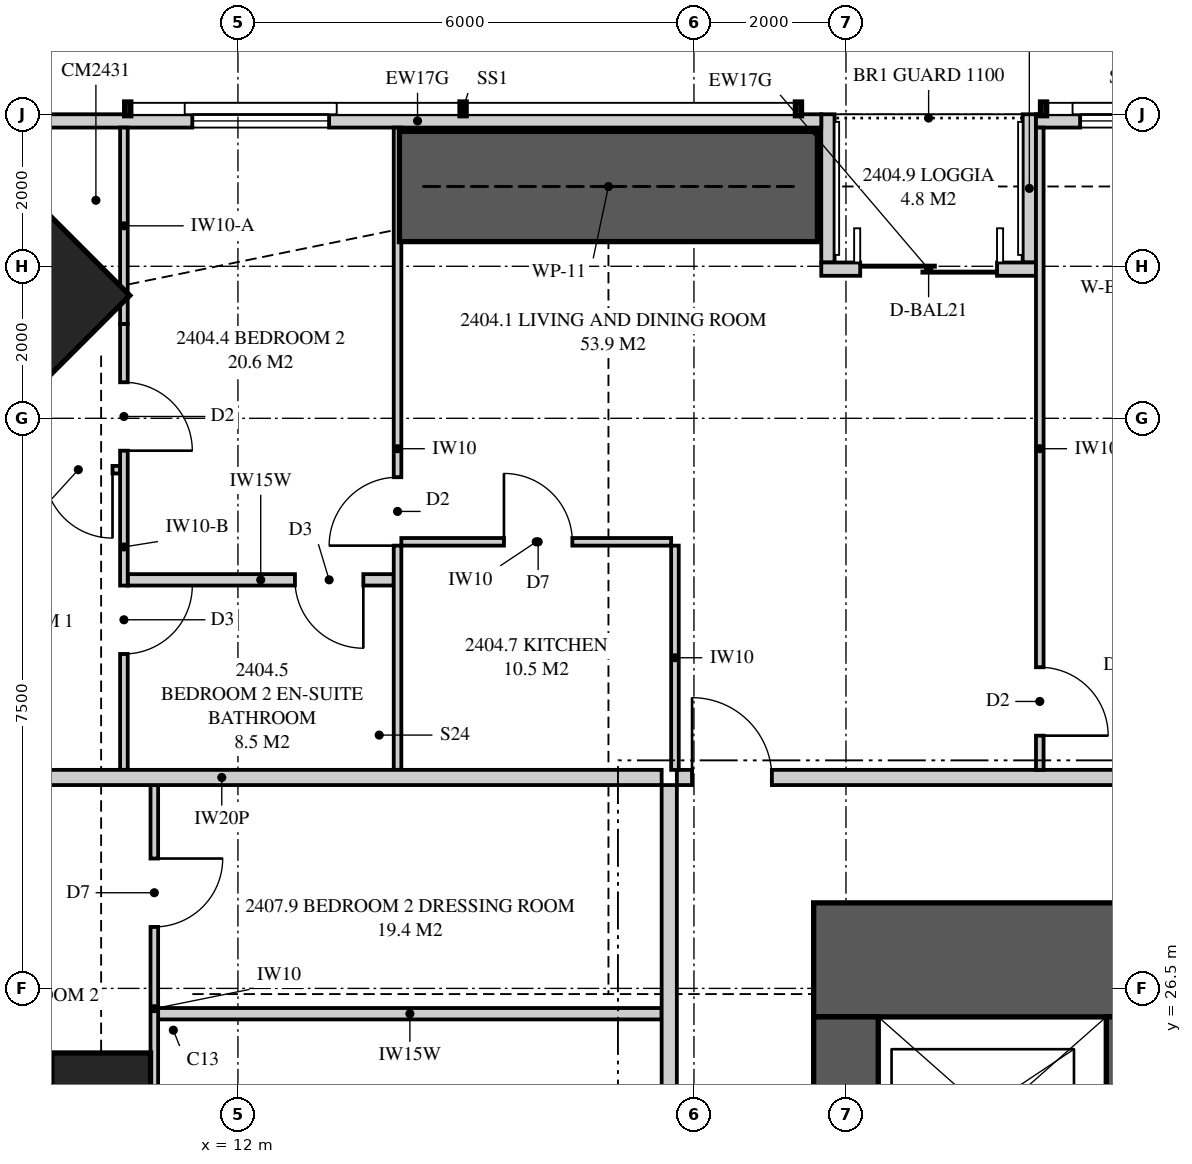
"""IFC4 building model, lengths in metres.
Left out: names, types, materials, properties, quantities, classifications, styles, units other than length and angle.
Written with IfcOpenShell. Run it as: python <this file> out.ifc"""

import sys

from ifc_helpers import new_model, si_unit, direction, frame, frame_2d, origin, origin_2d, place, context, subcontext, project, spatial, polyline, rectangle, outline, extrude, element, fill, save


model = new_model("IFC4")
c1 = context("Model", 3, precision=1e-05, world=origin(), true_north=direction((0.0, 1.0)))
c2 = subcontext(c1, "Body", "Model", "MODEL_VIEW")
j1 = project(units=[si_unit("LENGTHUNIT", "METRE"), si_unit("PLANEANGLEUNIT", "RADIAN")], contexts=[c1])
p1 = place(None, origin())
s1 = spatial("IfcSite", under=j1, at=p1, CompositionType="ELEMENT")
p2 = place(p1, origin())
s2 = spatial("IfcBuilding", under=s1, at=p2, CompositionType="ELEMENT")
p3 = place(p2, frame((0.0, 0.0, 91.45)))
s3 = spatial("IfcBuildingStorey", under=s2, at=p3, CompositionType="ELEMENT", Elevation=91.45)
p4 = place(p3, frame((8.631, 35.369, 0.0), z_axis=(0.0, 0.0, 1.0), x_axis=(0.707106781187, -0.707106781187, 0.0)))
e1 = element("IfcColumn", 1, at=p4, inside=s3, PredefinedType="COLUMN", context=c2, shape_type="SweptSolid", body=[
    extrude(rectangle(XDim=2.4, YDim=3.1, at=origin_2d()), origin(), (0.0, 0.0, 1.0), 3.35),
])
p5 = place(p3, frame((10.2, 25.0, 0.0), z_axis=(0.0, 0.0, 1.0), x_axis=(1.0, 0.0, 0.0)))
e2 = element("IfcColumn", 2, at=p5, inside=s3, PredefinedType="COLUMN", context=c2, shape_type="SweptSolid", body=[
    extrude(rectangle(XDim=1.3, YDim=1.3, at=origin_2d()), origin(), (0.0, 0.0, 1.0), 3.35),
])
p6 = place(p3, frame((26.0, 26.875, 0.0), z_axis=(0.0, 0.0, 1.0), x_axis=(-1.0, 0.0, 0.0)))
e3 = element("IfcWall", 3, at=p6, inside=s3, PredefinedType="SHEAR", context=c2, shape_type="SweptSolid", body=[
    extrude(rectangle(XDim=6.425, YDim=1.5, at=frame_2d((3.212, 0.0))), origin(), (0.0, 0.0, 1.0), 3.35),
])
p7 = place(p6, frame((0.825, 0.0, 0.0)))
e4 = element("IfcOpeningElement", 4, at=p7, cuts=e3, PredefinedType="OPENING", context=c2, shape_type="SweptSolid", body=[
    extrude(rectangle(XDim=0.75, YDim=2.1, at=frame_2d((0.375, 1.05))), frame((0.0, 0.76, 0.0), z_axis=(0.0, -1.0, 0.0), x_axis=(1.0, 0.0, 0.0)), (0.0, 0.0, 1.0), 1.52),
])
p8 = place(p3, frame((20.0, 26.125, 0.0), z_axis=(0.0, 0.0, 1.0), x_axis=(0.0, -1.0, 0.0)))
e5 = element("IfcWall", 5, at=p8, inside=s3, PredefinedType="SHEAR", context=c2, shape_type="SweptSolid", body=[
    extrude(rectangle(XDim=2.825, YDim=0.85, at=frame_2d((1.413, 0.0))), origin(), (0.0, 0.0, 1.0), 3.35),
])
p9 = place(p3, frame((23.6, 23.3, 0.0), z_axis=(0.0, 0.0, 1.0), x_axis=(0.0, 1.0, 0.0)))
e6 = element("IfcWall", 6, at=p9, inside=s3, PredefinedType="SHEAR", context=c2, shape_type="SweptSolid", body=[
    extrude(rectangle(XDim=2.825, YDim=0.35, at=frame_2d((1.413, 0.0))), origin(), (0.0, 0.0, 1.0), 3.35),
])
p10 = place(p3, frame((30.675, 37.913, 0.0), z_axis=(0.0, 0.0, 1.0), x_axis=(-1.0, 0.0, 0.0)))
e7 = element("IfcWall", 7, at=p10, inside=s3, PredefinedType="SOLIDWALL", context=c2, shape_type="SweptSolid", body=[
    extrude(rectangle(XDim=8.175, YDim=0.175, at=frame_2d((4.087, 0.0))), origin(), (0.0, 0.0, 1.0), 2.15),
])
p11 = place(p10, frame((5.794, 0.0, 0.4)))
e8 = element("IfcOpeningElement", 8, at=p11, cuts=e7, PredefinedType="OPENING", context=c2, shape_type="SweptSolid", body=[
    extrude(rectangle(XDim=1.8, YDim=1.7, at=frame_2d((0.9, 0.85))), frame((0.0, 0.097, 0.0), z_axis=(0.0, -1.0, 0.0), x_axis=(1.0, 0.0, 0.0)), (0.0, 0.0, 1.0), 0.195),
])
p12 = place(p3, frame((19.675, 37.913, 0.0), z_axis=(0.0, 0.0, 1.0), x_axis=(-1.0, 0.0, 0.0)))
e9 = element("IfcWall", 9, at=p12, inside=s3, PredefinedType="SOLIDWALL", context=c2, shape_type="SweptSolid", body=[
    extrude(outline(polyline([(0.0, 0.0), (10.624, 0.0), (10.624, 3.11), (3.003, 3.11), (3.003, 2.15), (2.958, 2.15), (2.958, 3.11), (2.8, 3.11), (2.8, 2.15), (0.0, 2.15), (0.0, 0.0)])), frame((0.0, 0.087, 0.0), z_axis=(0.0, -1.0, 0.0), x_axis=(1.0, 0.0, 0.0)), (0.0, 0.0, 1.0), 0.175),
])
p13 = place(p12, frame((6.475, 0.0, 0.4)))
e10 = element("IfcOpeningElement", 10, at=p13, cuts=e9, PredefinedType="OPENING", context=c2, shape_type="SweptSolid", body=[
    extrude(rectangle(XDim=1.8, YDim=1.7, at=frame_2d((0.9, 0.85))), frame((0.0, 0.097, 0.0), z_axis=(0.0, -1.0, 0.0), x_axis=(1.0, 0.0, 0.0)), (0.0, 0.0, 1.0), 0.195),
])
p14 = place(p3, frame((22.5, 35.962, 0.0), z_axis=(0.0, 0.0, 1.0), x_axis=(-1.0, 0.0, 0.0)))
e11 = element("IfcWall", 11, at=p14, inside=s3, PredefinedType="SOLIDWALL", context=c2, shape_type="SweptSolid", body=[
    extrude(rectangle(XDim=2.825, YDim=0.175, at=frame_2d((1.413, 0.0))), origin(), (0.0, 0.0, 1.0), 3.11),
])
p15 = place(p14, frame((0.512, 0.0, 0.0)))
e12 = element("IfcOpeningElement", 12, at=p15, cuts=e11, PredefinedType="OPENING", context=c2, shape_type="SweptSolid", body=[
    extrude(rectangle(XDim=1.8, YDim=2.1, at=frame_2d((0.9, 1.05))), frame((0.0, 0.097, 0.0), z_axis=(0.0, -1.0, 0.0), x_axis=(1.0, 0.0, 0.0)), (0.0, 0.0, 1.0), 0.195),
])
for number, where, z_axis, x_axis in (
    (13, (22.413, 38.0, 0.0), (0.0, 0.0, 1.0), (0.0, -1.0, 0.0)),
    (14, (19.762, 38.0, 0.0), (0.0, 0.0, 1.0), (0.0, -1.0, 0.0)),
):
    element("IfcWall", number, at=place(p3, frame(where, z_axis=z_axis, x_axis=x_axis)), inside=s3, PredefinedType="SOLIDWALL", context=c2, shape_type="SweptSolid", body=[
        extrude(outline(polyline([(0.0, 0.0), (1.95, 0.0), (1.95, 3.11), (1.75, 3.11), (1.75, 2.15), (0.15, 2.15), (0.15, 3.11), (0.0, 3.11), (0.0, 0.0)])), frame((0.0, 0.087, 0.0), z_axis=(0.0, -1.0, 0.0), x_axis=(1.0, 0.0, 0.0)), (0.0, 0.0, 1.0), 0.175),
    ])
p16 = place(p3, frame((17.775, 29.275, 0.0), z_axis=(0.0, 0.0, 1.0), x_axis=(1.0, 0.0, 0.0)))
e15 = element("IfcWall", 15, at=p16, inside=s3, PredefinedType="PARTITIONING", context=c2, shape_type="SweptSolid", body=[
    extrude(rectangle(XDim=8.375, YDim=0.2, at=frame_2d((4.188, 0.0))), origin(), (0.0, 0.0, 1.0), 3.11),
])
p17 = place(p16, frame((0.2, 0.0, 0.0)))
e16 = element("IfcOpeningElement", 16, at=p17, cuts=e15, PredefinedType="OPENING", context=c2, shape_type="SweptSolid", body=[
    extrude(rectangle(XDim=1.05, YDim=2.2, at=frame_2d((0.525, 1.1))), frame((0.0, 0.11, 0.0), z_axis=(0.0, -1.0, 0.0), x_axis=(1.0, 0.0, 0.0)), (0.0, 0.0, 1.0), 0.22),
])
p18 = place(p3, frame((10.5, 37.825, 0.0), z_axis=(0.0, 0.0, 1.0), x_axis=(0.0, -1.0, 0.0)))
e17 = element("IfcWall", 17, at=p18, inside=s3, PredefinedType="PARTITIONING", context=c2, shape_type="SweptSolid", body=[
    extrude(outline(polyline([(0.0, 0.0), (2.585, 0.0), (2.585, 2.15), (1.198, 2.15), (1.198, 3.11), (0.0, 3.11), (0.0, 0.0)])), frame((0.0, 0.05, 0.0), z_axis=(0.0, -1.0, 0.0), x_axis=(1.0, 0.0, 0.0)), (0.0, 0.0, 1.0), 0.1),
])
p19 = place(p3, frame((10.5, 35.24, 0.0), z_axis=(0.0, 0.0, 1.0), x_axis=(0.0, -1.0, 0.0)))
e18 = element("IfcWall", 18, at=p19, inside=s3, PredefinedType="PARTITIONING", context=c2, shape_type="SweptSolid", body=[
    extrude(outline(polyline([(0.0, 0.0), (5.865, 0.0), (5.865, 2.51), (0.368, 2.51), (0.368, 2.15), (0.0, 2.15), (0.0, 0.0)])), frame((0.0, 0.05, 0.0), z_axis=(0.0, -1.0, 0.0), x_axis=(1.0, 0.0, 0.0)), (0.0, 0.0, 1.0), 0.1),
])
p20 = place(p19, frame((0.766, 0.0, 0.0)))
e19 = element("IfcOpeningElement", 19, at=p20, cuts=e18, PredefinedType="OPENING", context=c2, shape_type="SweptSolid", body=[
    extrude(rectangle(XDim=0.9, YDim=2.1, at=frame_2d((0.45, 1.05))), frame((0.0, 0.06, 0.0), z_axis=(0.0, -1.0, 0.0), x_axis=(1.0, 0.0, 0.0)), (0.0, 0.0, 1.0), 0.12),
])
p21 = place(p19, frame((3.441, 0.0, 0.0)))
e20 = element("IfcOpeningElement", 20, at=p21, cuts=e18, PredefinedType="OPENING", context=c2, shape_type="SweptSolid", body=[
    extrude(rectangle(XDim=0.9, YDim=2.1, at=frame_2d((0.45, 1.05))), frame((0.0, 0.06, 0.0), z_axis=(0.0, -1.0, 0.0), x_axis=(1.0, 0.0, 0.0)), (0.0, 0.0, 1.0), 0.12),
])
p22 = place(p3, frame((14.1, 37.825, 0.0), z_axis=(0.0, 0.0, 1.0), x_axis=(0.0, -1.0, 0.0)))
e21 = element("IfcWall", 21, at=p22, inside=s3, PredefinedType="PARTITIONING", context=c2, shape_type="SweptSolid", body=[
    extrude(outline(polyline([(0.0, 0.0), (8.45, 0.0), (8.45, 3.11), (2.219, 3.11), (2.219, 2.15), (0.463, 2.15), (0.463, 3.11), (0.0, 3.11), (0.0, 0.0)])), frame((0.0, 0.05, 0.0), z_axis=(0.0, -1.0, 0.0), x_axis=(1.0, 0.0, 0.0)), (0.0, 0.0, 1.0), 0.1),
])
p23 = place(p22, frame((4.6, 0.0, 0.0)))
e22 = element("IfcOpeningElement", 22, at=p23, cuts=e21, PredefinedType="OPENING", context=c2, shape_type="SweptSolid", body=[
    extrude(rectangle(XDim=0.9, YDim=2.1, at=frame_2d((0.45, 1.05))), frame((0.0, 0.06, 0.0), z_axis=(0.0, -1.0, 0.0), x_axis=(1.0, 0.0, 0.0)), (0.0, 0.0, 1.0), 0.12),
])
p24 = place(p3, frame((6.0, 33.324, 0.0), z_axis=(0.0, 0.0, 1.0), x_axis=(1.0, 0.0, 0.0)))
e23 = element("IfcWall", 23, at=p24, inside=s3, PredefinedType="PARTITIONING", context=c2, shape_type="SweptSolid", body=[
    extrude(outline(polyline([(0.0, 0.0), (4.45, 0.0), (4.45, 3.11), (4.45, 2.51), (3.171, 2.51), (3.171, 2.15), (1.429, 2.15), (1.429, 3.11), (0.0, 3.11), (0.0, 0.0)])), frame((0.0, 0.05, 0.0), z_axis=(0.0, -1.0, 0.0), x_axis=(1.0, 0.0, 0.0)), (0.0, 0.0, 1.0), 0.1),
])
p25 = place(p24, frame((3.45, 0.0, 0.0)))
e24 = element("IfcOpeningElement", 24, at=p25, cuts=e23, PredefinedType="OPENING", context=c2, shape_type="SweptSolid", body=[
    extrude(rectangle(XDim=0.9, YDim=2.1, at=frame_2d((0.45, 1.05))), frame((0.0, 0.06, 0.0), z_axis=(0.0, -1.0, 0.0), x_axis=(1.0, 0.0, 0.0)), (0.0, 0.0, 1.0), 0.12),
])
p26 = place(p3, frame((10.55, 31.875, 0.0), z_axis=(0.0, 0.0, 1.0), x_axis=(1.0, 0.0, 0.0)))
e25 = element("IfcWall", 25, at=p26, inside=s3, PredefinedType="PLUMBINGWALL", context=c2, shape_type="SweptSolid", body=[
    extrude(outline(polyline([(0.0, 0.0), (3.5, 0.0), (3.5, 3.11), (0.935, 3.11), (0.935, 2.51), (0.0, 2.51), (0.0, 3.11), (0.0, 0.0)])), frame((0.0, 0.075, 0.0), z_axis=(0.0, -1.0, 0.0), x_axis=(1.0, 0.0, 0.0)), (0.0, 0.0, 1.0), 0.15),
])
p27 = place(p26, frame((2.2, 0.0, 0.0)))
e26 = element("IfcOpeningElement", 26, at=p27, cuts=e25, PredefinedType="OPENING", context=c2, shape_type="SweptSolid", body=[
    extrude(rectangle(XDim=0.9, YDim=2.1, at=frame_2d((0.45, 1.05))), frame((0.0, 0.085, 0.0), z_axis=(0.0, -1.0, 0.0), x_axis=(1.0, 0.0, 0.0)), (0.0, 0.0, 1.0), 0.17),
])
p28 = place(p3, frame((22.55, 37.825, 0.0), z_axis=(0.0, 0.0, 1.0), x_axis=(0.0, -1.0, 0.0)))
e27 = element("IfcWall", 27, at=p28, inside=s3, PredefinedType="PARTITIONING", context=c2, shape_type="SweptSolid", body=[
    extrude(outline(polyline([(0.0, 0.0), (8.45, 0.0), (8.45, 3.11), (1.635, 3.11), (1.635, 2.15), (0.0, 2.15), (0.0, 3.11), (0.0, 0.0)])), frame((0.0, 0.05, 0.0), z_axis=(0.0, -1.0, 0.0), x_axis=(1.0, 0.0, 0.0)), (0.0, 0.0, 1.0), 0.1),
])
p29 = place(p28, frame((7.1, 0.0, 0.0)))
e28 = element("IfcOpeningElement", 28, at=p29, cuts=e27, PredefinedType="OPENING", context=c2, shape_type="SweptSolid", body=[
    extrude(rectangle(XDim=0.9, YDim=2.1, at=frame_2d((0.45, 1.05))), frame((0.0, 0.06, 0.0), z_axis=(0.0, -1.0, 0.0), x_axis=(1.0, 0.0, 0.0)), (0.0, 0.0, 1.0), 0.12),
])
p30 = place(p3, frame((14.15, 32.375, 0.0), z_axis=(0.0, 0.0, 1.0), x_axis=(1.0, 0.0, 0.0)))
e29 = element("IfcWall", 29, at=p30, inside=s3, PredefinedType="PARTITIONING", context=c2, shape_type="SweptSolid", body=[
    extrude(outline(polyline([(0.0, 0.0), (3.55, 0.0), (3.55, 3.11), (3.012, 3.11), (3.012, 2.541), (2.438, 2.541), (2.438, 3.11), (0.0, 3.11), (0.0, 0.0)])), frame((0.0, 0.05, 0.0), z_axis=(0.0, -1.0, 0.0), x_axis=(1.0, 0.0, 0.0)), (0.0, 0.0, 1.0), 0.1),
])
p31 = place(p30, frame((1.35, 0.0, 0.0)))
e30 = element("IfcOpeningElement", 30, at=p31, cuts=e29, PredefinedType="OPENING", context=c2, shape_type="SweptSolid", body=[
    extrude(rectangle(XDim=0.9, YDim=2.1, at=frame_2d((0.45, 1.05))), frame((0.0, 0.06, 0.0), z_axis=(0.0, -1.0, 0.0), x_axis=(1.0, 0.0, 0.0)), (0.0, 0.0, 1.0), 0.12),
])
p32 = place(p3, frame((17.75, 32.325, 0.0), z_axis=(0.0, 0.0, 1.0), x_axis=(0.0, -1.0, 0.0)))
e31 = element("IfcWall", 31, at=p32, inside=s3, PredefinedType="PARTITIONING", context=c2, shape_type="SweptSolid", body=[
    extrude(rectangle(XDim=2.95, YDim=0.1, at=frame_2d((1.475, 0.0))), origin(), (0.0, 0.0, 1.0), 3.11),
])
p33 = place(p3, frame((6.0, 29.275, 0.0), z_axis=(0.0, 0.0, 1.0), x_axis=(1.0, 0.0, 0.0)))
e32 = element("IfcWall", 32, at=p33, inside=s3, PredefinedType="PARTITIONING", context=c2, shape_type="SweptSolid", body=[
    extrude(outline(polyline([(0.0, 0.0), (11.575, 0.0), (11.575, 3.11), (11.212, 3.11), (11.212, 2.541), (10.538, 2.541), (10.538, 3.11), (5.51, 3.11), (5.51, 2.51), (2.969, 2.51), (2.969, 2.541), (2.565, 2.541), (2.565, 2.15), (0.721, 2.15), (0.721, 3.11), (0.0, 3.11), (0.0, 0.0)])), frame((0.0, 0.1, 0.0), z_axis=(0.0, -1.0, 0.0), x_axis=(1.0, 0.0, 0.0)), (0.0, 0.0, 1.0), 0.2),
])
p34 = place(p3, frame((17.675, 19.7, 0.0), z_axis=(0.0, 0.0, 1.0), x_axis=(0.0, 1.0, 0.0)))
e33 = element("IfcWall", 33, at=p34, inside=s3, PredefinedType="PARTITIONING", context=c2, shape_type="SweptSolid", body=[
    extrude(outline(polyline([(0.0, 0.0), (9.475, 0.0), (9.475, 3.11), (7.062, 3.11), (7.062, 2.541), (6.388, 2.541), (6.388, 3.11), (0.0, 3.11), (0.0, 0.0)])), frame((0.0, 0.1, 0.0), z_axis=(0.0, -1.0, 0.0), x_axis=(1.0, 0.0, 0.0)), (0.0, 0.0, 1.0), 0.2),
])
p35 = place(p3, frame((10.9, 23.292, 0.0), z_axis=(0.0, 0.0, 1.0), x_axis=(0.0, 1.0, 0.0)))
e34 = element("IfcWall", 34, at=p35, inside=s3, PredefinedType="PARTITIONING", context=c2, shape_type="SweptSolid", body=[
    extrude(outline(polyline([(0.0, 0.0), (5.883, 0.0), (5.883, 3.11), (5.883, 2.51), (1.768, 2.51), (0.0, 2.51), (0.0, 3.11), (0.0, 0.0)])), frame((0.0, 0.05, 0.0), z_axis=(0.0, -1.0, 0.0), x_axis=(1.0, 0.0, 0.0)), (0.0, 0.0, 1.0), 0.1),
])
p36 = place(p35, frame((0.15, 0.0, 0.0)))
e35 = element("IfcOpeningElement", 35, at=p36, cuts=e34, PredefinedType="OPENING", context=c2, shape_type="SweptSolid", body=[
    extrude(rectangle(XDim=0.9, YDim=2.1, at=frame_2d((0.45, 1.05))), frame((0.0, 0.06, 0.0), z_axis=(0.0, -1.0, 0.0), x_axis=(1.0, 0.0, 0.0)), (0.0, 0.0, 1.0), 0.12),
])
p37 = place(p35, frame((4.017, 0.0, 0.0)))
e36 = element("IfcOpeningElement", 36, at=p37, cuts=e34, PredefinedType="OPENING", context=c2, shape_type="SweptSolid", body=[
    extrude(rectangle(XDim=0.9, YDim=2.1, at=frame_2d((0.45, 1.05))), frame((0.0, 0.06, 0.0), z_axis=(0.0, -1.0, 0.0), x_axis=(1.0, 0.0, 0.0)), (0.0, 0.0, 1.0), 0.12),
])
p38 = place(p3, frame((10.95, 26.167, 0.0), z_axis=(0.0, 0.0, 1.0), x_axis=(1.0, 0.0, 0.0)))
e37 = element("IfcWall", 37, at=p38, inside=s3, PredefinedType="PLUMBINGWALL", context=c2, shape_type="SweptSolid", body=[
    extrude(outline(polyline([(0.0, 0.0), (6.625, 0.0), (6.625, 3.11), (6.625, 2.541), (0.535, 2.541), (0.535, 2.51), (0.0, 2.51), (0.0, 3.11), (0.0, 0.0)])), frame((0.0, 0.075, 0.0), z_axis=(0.0, -1.0, 0.0), x_axis=(1.0, 0.0, 0.0)), (0.0, 0.0, 1.0), 0.15),
])
p39 = place(p3, frame((14.125, 37.05, 0.0), z_axis=(0.0, 0.0, 1.0), x_axis=(1.0, 0.0, 0.0)))
e38 = element("IfcWall", 38, at=p39, inside=s3, PredefinedType="SHEAR", context=c2, shape_type="SweptSolid", body=[
    extrude(rectangle(XDim=5.5, YDim=1.45, at=frame_2d((2.75, 0.0))), origin(), (0.0, 0.0, 1.0), 3.35),
])
p40 = place(p11, origin())
e39 = element("IfcWindow", 39, at=p40, inside=s3, PartitioningType="SINGLE_PANEL", PredefinedType="WINDOW", context=c2, shape_type="SweptSolid", body=[
    extrude(rectangle(XDim=1.8, YDim=1.7, at=frame_2d((0.9, 0.85))), frame((0.0, 0.03, 0.0), z_axis=(0.0, -1.0, 0.0), x_axis=(1.0, 0.0, 0.0)), (0.0, 0.0, 1.0), 0.06),
])
fill(e8, e39)
p41 = place(p15, origin())
e40 = element("IfcDoor", 40, at=p41, inside=s3, OperationType="SLIDING_TO_LEFT", PredefinedType="DOOR", context=c2, shape_type="SweptSolid", body=[
    extrude(rectangle(XDim=1.8, YDim=2.1, at=frame_2d((0.9, 1.05))), frame((0.0, 0.025, 0.0), z_axis=(0.0, -1.0, 0.0), x_axis=(1.0, 0.0, 0.0)), (0.0, 0.0, 1.0), 0.05),
])
fill(e12, e40)
p42 = place(p13, origin())
e41 = element("IfcWindow", 41, at=p42, inside=s3, PartitioningType="SINGLE_PANEL", PredefinedType="WINDOW", context=c2, shape_type="SweptSolid", body=[
    extrude(rectangle(XDim=1.8, YDim=1.7, at=frame_2d((0.9, 0.85))), frame((0.0, 0.03, 0.0), z_axis=(0.0, -1.0, 0.0), x_axis=(1.0, 0.0, 0.0)), (0.0, 0.0, 1.0), 0.06),
])
fill(e10, e41)
p43 = place(p17, origin())
e42 = element("IfcDoor", 42, at=p43, inside=s3, OperationType="SINGLE_SWING_LEFT", PredefinedType="DOOR", context=c2, shape_type="SweptSolid", body=[
    extrude(rectangle(XDim=1.05, YDim=2.2, at=frame_2d((0.525, 1.1))), frame((0.0, 0.025, 0.0), z_axis=(0.0, -1.0, 0.0), x_axis=(1.0, 0.0, 0.0)), (0.0, 0.0, 1.0), 0.05),
])
fill(e16, e42)
p44 = place(p25, frame((0.9, 0.0, 0.0), z_axis=(0.0, 0.0, 1.0), x_axis=(-1.0, 0.0, 0.0)))
e43 = element("IfcDoor", 43, at=p44, inside=s3, OperationType="SINGLE_SWING_LEFT", PredefinedType="DOOR", context=c2, shape_type="SweptSolid", body=[
    extrude(rectangle(XDim=0.9, YDim=2.1, at=frame_2d((0.45, 1.05))), frame((0.0, 0.025, 0.0), z_axis=(0.0, -1.0, 0.0), x_axis=(1.0, 0.0, 0.0)), (0.0, 0.0, 1.0), 0.05),
])
fill(e24, e43)
p45 = place(p20, origin())
e44 = element("IfcDoor", 44, at=p45, inside=s3, OperationType="SINGLE_SWING_RIGHT", PredefinedType="DOOR", context=c2, shape_type="SweptSolid", body=[
    extrude(rectangle(XDim=0.9, YDim=2.1, at=frame_2d((0.45, 1.05))), frame((0.0, 0.025, 0.0), z_axis=(0.0, -1.0, 0.0), x_axis=(1.0, 0.0, 0.0)), (0.0, 0.0, 1.0), 0.05),
])
fill(e19, e44)
p46 = place(p23, frame((0.9, 0.0, 0.0), z_axis=(0.0, 0.0, 1.0), x_axis=(-1.0, 0.0, 0.0)))
e45 = element("IfcDoor", 45, at=p46, inside=s3, OperationType="SINGLE_SWING_LEFT", PredefinedType="DOOR", context=c2, shape_type="SweptSolid", body=[
    extrude(rectangle(XDim=0.9, YDim=2.1, at=frame_2d((0.45, 1.05))), frame((0.0, 0.025, 0.0), z_axis=(0.0, -1.0, 0.0), x_axis=(1.0, 0.0, 0.0)), (0.0, 0.0, 1.0), 0.05),
])
fill(e22, e45)
p47 = place(p27, frame((0.9, 0.0, 0.0), z_axis=(0.0, 0.0, 1.0), x_axis=(-1.0, 0.0, 0.0)))
e46 = element("IfcDoor", 46, at=p47, inside=s3, OperationType="SINGLE_SWING_LEFT", PredefinedType="DOOR", context=c2, shape_type="SweptSolid", body=[
    extrude(rectangle(XDim=0.9, YDim=2.1, at=frame_2d((0.45, 1.05))), frame((0.0, 0.025, 0.0), z_axis=(0.0, -1.0, 0.0), x_axis=(1.0, 0.0, 0.0)), (0.0, 0.0, 1.0), 0.05),
])
fill(e26, e46)
p48 = place(p21, origin())
e47 = element("IfcDoor", 47, at=p48, inside=s3, OperationType="SINGLE_SWING_LEFT", PredefinedType="DOOR", context=c2, shape_type="SweptSolid", body=[
    extrude(rectangle(XDim=0.9, YDim=2.1, at=frame_2d((0.45, 1.05))), frame((0.0, 0.025, 0.0), z_axis=(0.0, -1.0, 0.0), x_axis=(1.0, 0.0, 0.0)), (0.0, 0.0, 1.0), 0.05),
])
fill(e20, e47)
p49 = place(p29, origin())
e48 = element("IfcDoor", 48, at=p49, inside=s3, OperationType="SINGLE_SWING_RIGHT", PredefinedType="DOOR", context=c2, shape_type="SweptSolid", body=[
    extrude(rectangle(XDim=0.9, YDim=2.1, at=frame_2d((0.45, 1.05))), frame((0.0, 0.025, 0.0), z_axis=(0.0, -1.0, 0.0), x_axis=(1.0, 0.0, 0.0)), (0.0, 0.0, 1.0), 0.05),
])
fill(e28, e48)
p50 = place(p31, origin())
e49 = element("IfcDoor", 49, at=p50, inside=s3, OperationType="SINGLE_SWING_LEFT", PredefinedType="DOOR", context=c2, shape_type="SweptSolid", body=[
    extrude(rectangle(XDim=0.9, YDim=2.1, at=frame_2d((0.45, 1.05))), frame((0.0, 0.025, 0.0), z_axis=(0.0, -1.0, 0.0), x_axis=(1.0, 0.0, 0.0)), (0.0, 0.0, 1.0), 0.05),
])
fill(e30, e49)
p51 = place(p37, frame((0.9, 0.0, 0.0), z_axis=(0.0, 0.0, 1.0), x_axis=(-1.0, 0.0, 0.0)))
e50 = element("IfcDoor", 50, at=p51, inside=s3, OperationType="SINGLE_SWING_LEFT", PredefinedType="DOOR", context=c2, shape_type="SweptSolid", body=[
    extrude(rectangle(XDim=0.9, YDim=2.1, at=frame_2d((0.45, 1.05))), frame((0.0, 0.025, 0.0), z_axis=(0.0, -1.0, 0.0), x_axis=(1.0, 0.0, 0.0)), (0.0, 0.0, 1.0), 0.05),
])
fill(e36, e50)
save(model, sys.argv[1])
